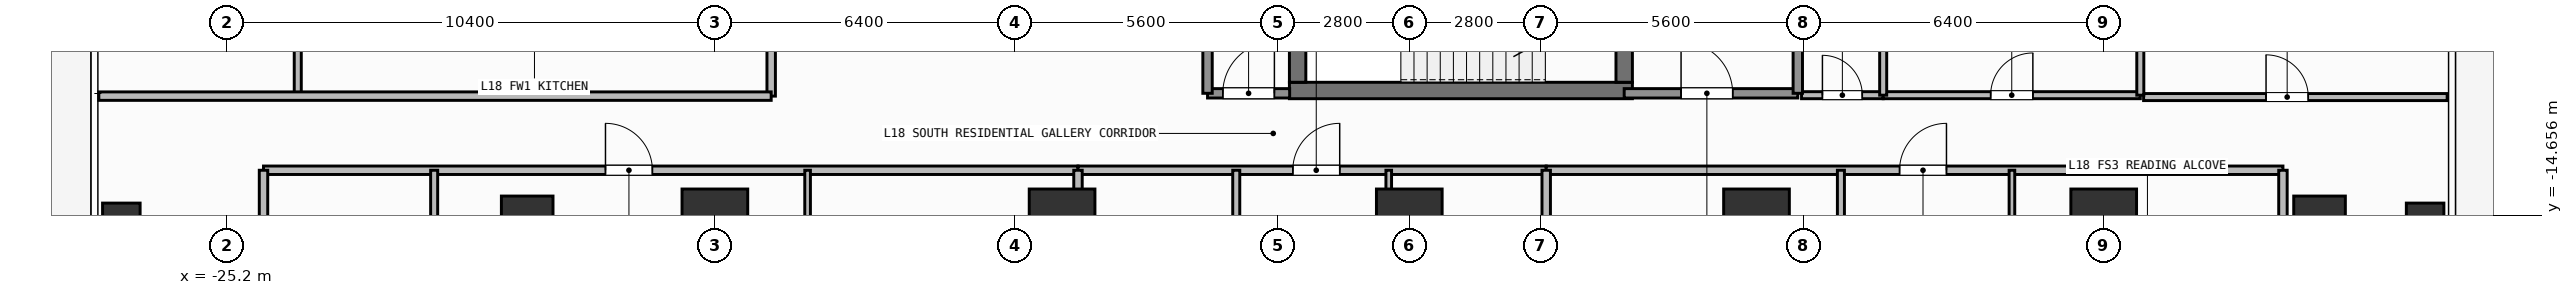
"""IFC4 building model, lengths in metres.
Left out: names, types, materials, properties, quantities, classifications, styles, units other than length and angle.
Written with IfcOpenShell. Run it as: python <this file> out.ifc"""

import sys

from ifc_helpers import new_model, si_unit, direction, frame, frame_2d, origin, origin_2d, place, context, subcontext, project, spatial, rectangle, hollow_rectangle, extrude, element, fill, save


model = new_model("IFC4")
c1 = context("Model", 3, precision=1e-05, world=origin(), true_north=direction((0.0, 1.0)))
c2 = subcontext(c1, "Body", "Model", "MODEL_VIEW")
j1 = project(units=[si_unit("LENGTHUNIT", "METRE"), si_unit("PLANEANGLEUNIT", "RADIAN")], contexts=[c1])
p1 = place(None, origin())
s1 = spatial("IfcSite", under=j1, at=p1, CompositionType="ELEMENT")
p2 = place(p1, origin())
s2 = spatial("IfcBuilding", under=s1, at=p2, CompositionType="ELEMENT")
p3 = place(p2, frame((0.0, 0.0, 69.6)))
s3 = spatial("IfcBuildingStorey", under=s2, at=p3, CompositionType="ELEMENT", Elevation=69.6)
p4 = place(p3, frame((-2.555, -12.0, 0.0), z_axis=(0.0, 0.0, 1.0), x_axis=(1.0, 0.0, 0.0)))
e1 = element("IfcWall", 1, at=p4, inside=s3, PredefinedType="SHEAR", context=c2, shape_type="SweptSolid", body=[
    extrude(rectangle(XDim=7.31, YDim=0.35, at=frame_2d((3.655, 0.0))), origin(), (0.0, 0.0, 1.0), 3.9),
])
p5 = place(p3, frame((-2.38, -11.825, 0.0), z_axis=(0.0, 0.0, 1.0), x_axis=(0.0, 1.0, 0.0)))
e2 = element("IfcWall", 2, at=p5, inside=s3, PredefinedType="SHEAR", context=c2, shape_type="SweptSolid", body=[
    extrude(rectangle(XDim=2.925, YDim=0.35, at=frame_2d((1.462, 0.0))), origin(), (0.0, 0.0, 1.0), 3.9),
])
p6 = place(p3, frame((4.58, -8.9, 0.0), z_axis=(0.0, 0.0, 1.0), x_axis=(0.0, -1.0, 0.0)))
e3 = element("IfcWall", 3, at=p6, inside=s3, PredefinedType="SHEAR", context=c2, shape_type="SweptSolid", body=[
    extrude(rectangle(XDim=2.925, YDim=0.35, at=frame_2d((1.462, 0.0))), origin(), (0.0, 0.0, 1.0), 3.9),
])
p7 = place(p6, frame((0.913, 0.0, 0.0)))
e4 = element("IfcOpeningElement", 4, at=p7, cuts=e3, PredefinedType="OPENING", context=c2, shape_type="SweptSolid", body=[
    extrude(rectangle(XDim=1.1, YDim=2.15, at=frame_2d((0.55, 1.075))), frame((0.0, 0.185, 0.0), z_axis=(0.0, -1.0, 0.0), x_axis=(1.0, 0.0, 0.0)), (0.0, 0.0, 1.0), 0.37),
])
for number, where, z_axis, x_axis in (
    (5, (-14.8, -14.8, 0.0), (0.0, 0.0, 1.0), (1.0, 0.0, 0.0)),
    (6, (-7.4, -14.8, 0.0), (0.0, 0.0, 1.0), (1.0, 0.0, 0.0)),
    (7, (0.0, -14.8, 0.0), (0.0, 0.0, 1.0), (1.0, 0.0, 0.0)),
    (8, (7.4, -14.8, 0.0), (0.0, 0.0, 1.0), (1.0, 0.0, 0.0)),
    (9, (14.8, -14.8, 0.0), (0.0, 0.0, 1.0), (1.0, 0.0, 0.0)),
):
    element("IfcColumn", number, at=place(p3, frame(where, z_axis=z_axis, x_axis=x_axis)), inside=s3, PredefinedType="COLUMN", context=c2, shape_type="SweptSolid", body=[
        extrude(rectangle(XDim=1.4, YDim=1.4, at=origin_2d()), origin(), (0.0, 0.0, 1.0), 3.9),
    ])
for number, where, z_axis, x_axis in (
    (10, (-18.8, -14.8, 0.0), (0.0, 0.0, 1.0), (1.0, 0.0, 0.0)),
    (11, (19.4, -14.8, 0.0), (0.0, 0.0, 1.0), (1.0, 0.0, 0.0)),
):
    element("IfcColumn", number, at=place(p3, frame(where, z_axis=z_axis, x_axis=x_axis)), inside=s3, PredefinedType="COLUMN", context=c2, shape_type="SweptSolid", body=[
        extrude(rectangle(XDim=1.1, YDim=1.1, at=origin_2d()), origin(), (0.0, 0.0, 1.0), 3.9),
    ])
for number, where, z_axis, x_axis in (
    (12, (-27.45, -14.8, 0.0), (0.0, 0.0, 1.0), (1.0, 0.0, 0.0)),
    (13, (21.65, -14.8, 0.0), (0.0, 0.0, 1.0), (1.0, 0.0, 0.0)),
):
    element("IfcColumn", number, at=place(p3, frame(where, z_axis=z_axis, x_axis=x_axis)), inside=s3, PredefinedType="COLUMN", context=c2, shape_type="SweptSolid", body=[
        extrude(hollow_rectangle(XDim=0.8, YDim=0.8, WallThickness=0.036, at=origin_2d()), origin(), (0.0, 0.0, 1.0), 3.9),
    ])
p8 = place(p3, frame((4.58, -12.06, 0.0), z_axis=(0.0, 0.0, 1.0), x_axis=(1.0, 0.0, 0.0)))
e14 = element("IfcWall", 14, at=p8, inside=s3, PredefinedType="SOLIDWALL", context=c2, shape_type="SweptSolid", body=[
    extrude(rectangle(XDim=3.7, YDim=0.2, at=frame_2d((1.85, 0.0))), origin(), (0.0, 0.0, 1.0), 3.68),
])
p9 = place(p8, frame((1.212, 0.0, 0.0)))
e15 = element("IfcOpeningElement", 15, at=p9, cuts=e14, PredefinedType="OPENING", context=c2, shape_type="SweptSolid", body=[
    extrude(rectangle(XDim=1.1, YDim=2.15, at=frame_2d((0.55, 1.075))), frame((0.0, 0.11, 0.0), z_axis=(0.0, -1.0, 0.0), x_axis=(1.0, 0.0, 0.0)), (0.0, 0.0, 1.0), 0.22),
])
p10 = place(p3, frame((-4.3, -12.06, 0.0), z_axis=(0.0, 0.0, 1.0), x_axis=(1.0, 0.0, 0.0)))
e16 = element("IfcWall", 16, at=p10, inside=s3, PredefinedType="SOLIDWALL", context=c2, shape_type="SweptSolid", body=[
    extrude(rectangle(XDim=1.75, YDim=0.2, at=frame_2d((0.875, 0.0))), origin(), (0.0, 0.0, 1.0), 3.68),
])
p11 = place(p10, frame((0.325, 0.0, 0.0)))
e17 = element("IfcOpeningElement", 17, at=p11, cuts=e16, PredefinedType="OPENING", context=c2, shape_type="SweptSolid", body=[
    extrude(rectangle(XDim=1.1, YDim=2.15, at=frame_2d((0.55, 1.075))), frame((0.0, 0.11, 0.0), z_axis=(0.0, -1.0, 0.0), x_axis=(1.0, 0.0, 0.0)), (0.0, 0.0, 1.0), 0.22),
])
p12 = place(p3, frame((8.36, -12.1, 0.0), z_axis=(0.0, 0.0, 1.0), x_axis=(1.0, 0.0, 0.0)))
e18 = element("IfcWall", 18, at=p12, inside=s3, PredefinedType="PARTITIONING", context=c2, shape_type="SweptSolid", body=[
    extrude(rectangle(XDim=1.74, YDim=0.15, at=frame_2d((0.87, 0.0))), origin(), (0.0, 0.0, 1.0), 3.68),
])
p13 = place(p12, frame((0.445, 0.0, 0.0)))
e19 = element("IfcOpeningElement", 19, at=p13, cuts=e18, PredefinedType="OPENING", context=c2, shape_type="SweptSolid", body=[
    extrude(rectangle(XDim=0.85, YDim=2.1, at=frame_2d((0.425, 1.05))), frame((0.0, 0.085, 0.0), z_axis=(0.0, -1.0, 0.0), x_axis=(1.0, 0.0, 0.0)), (0.0, 0.0, 1.0), 0.17),
])
p14 = place(p3, frame((10.1, -12.1, 0.0), z_axis=(0.0, 0.0, 1.0), x_axis=(1.0, 0.0, 0.0)))
e20 = element("IfcWall", 20, at=p14, inside=s3, PredefinedType="PARTITIONING", context=c2, shape_type="SweptSolid", body=[
    extrude(rectangle(XDim=5.48, YDim=0.15, at=frame_2d((2.74, 0.0))), origin(), (0.0, 0.0, 1.0), 3.68),
])
p15 = place(p14, frame((2.29, 0.0, 0.0)))
e21 = element("IfcOpeningElement", 21, at=p15, cuts=e20, PredefinedType="OPENING", context=c2, shape_type="SweptSolid", body=[
    extrude(rectangle(XDim=0.9, YDim=2.1, at=frame_2d((0.45, 1.05))), frame((0.0, 0.085, 0.0), z_axis=(0.0, -1.0, 0.0), x_axis=(1.0, 0.0, 0.0)), (0.0, 0.0, 1.0), 0.17),
])
p16 = place(p3, frame((-24.42, -13.7, 0.0), z_axis=(0.0, 0.0, 1.0), x_axis=(1.0, 0.0, 0.0)))
e22 = element("IfcWall", 22, at=p16, inside=s3, PredefinedType="PARTITIONING", context=c2, shape_type="SweptSolid", body=[
    extrude(rectangle(XDim=17.359, YDim=0.18, at=frame_2d((8.679, 0.0))), origin(), (0.0, 0.0, 1.0), 3.68),
])
p17 = place(p16, frame((7.288, 0.0, 0.0)))
e23 = element("IfcOpeningElement", 23, at=p17, cuts=e22, PredefinedType="OPENING", context=c2, shape_type="SweptSolid", body=[
    extrude(rectangle(XDim=1.0, YDim=2.2, at=frame_2d((0.5, 1.1))), frame((0.0, 0.1, 0.0), z_axis=(0.0, -1.0, 0.0), x_axis=(1.0, 0.0, 0.0)), (0.0, 0.0, 1.0), 0.2),
])
p18 = place(p3, frame((-20.783, -20.79, 0.0), z_axis=(0.0, 0.0, 1.0), x_axis=(0.0, 1.0, 0.0)))
e24 = element("IfcWall", 24, at=p18, inside=s3, PredefinedType="PARTITIONING", context=c2, shape_type="SweptSolid", body=[
    extrude(rectangle(XDim=7.09, YDim=0.15, at=frame_2d((3.545, 0.0))), origin(), (0.0, 0.0, 1.0), 3.68),
])
p19 = place(p18, frame((3.03, 0.0, 0.0)))
e25 = element("IfcOpeningElement", 25, at=p19, cuts=e24, PredefinedType="OPENING", context=c2, shape_type="SweptSolid", body=[
    extrude(rectangle(XDim=0.85, YDim=2.1, at=frame_2d((0.425, 1.05))), frame((0.0, 0.085, 0.0), z_axis=(0.0, -1.0, 0.0), x_axis=(1.0, 0.0, 0.0)), (0.0, 0.0, 1.0), 0.17),
])
p20 = place(p3, frame((-12.824, -18.663, 0.0), z_axis=(0.0, 0.0, 1.0), x_axis=(0.0, 1.0, 0.0)))
e26 = element("IfcWall", 26, at=p20, inside=s3, PredefinedType="PARTITIONING", context=c2, shape_type="SweptSolid", body=[
    extrude(rectangle(XDim=4.963, YDim=0.12, at=frame_2d((2.481, 0.0))), origin(), (0.0, 0.0, 1.0), 3.68),
])
p21 = place(p20, frame((2.229, 0.0, 0.0)))
e27 = element("IfcOpeningElement", 27, at=p21, cuts=e26, PredefinedType="OPENING", context=c2, shape_type="SweptSolid", body=[
    extrude(rectangle(XDim=0.85, YDim=2.1, at=frame_2d((0.425, 1.05))), frame((0.0, 0.07, 0.0), z_axis=(0.0, -1.0, 0.0), x_axis=(1.0, 0.0, 0.0)), (0.0, 0.0, 1.0), 0.14),
])
p22 = place(p3, frame((-7.061, -13.7, 0.0), z_axis=(0.0, 0.0, 1.0), x_axis=(1.0, 0.0, 0.0)))
e28 = element("IfcWall", 28, at=p22, inside=s3, PredefinedType="PARTITIONING", context=c2, shape_type="SweptSolid", body=[
    extrude(rectangle(XDim=9.979, YDim=0.18, at=frame_2d((4.99, 0.0))), origin(), (0.0, 0.0, 1.0), 3.68),
])
p23 = place(p22, frame((4.578, 0.0, 0.0)))
e29 = element("IfcOpeningElement", 29, at=p23, cuts=e28, PredefinedType="OPENING", context=c2, shape_type="SweptSolid", body=[
    extrude(rectangle(XDim=1.0, YDim=2.2, at=frame_2d((0.5, 1.1))), frame((0.0, 0.1, 0.0), z_axis=(0.0, -1.0, 0.0), x_axis=(1.0, 0.0, 0.0)), (0.0, 0.0, 1.0), 0.2),
])
p24 = place(p3, frame((-3.688, -20.79, 0.0), z_axis=(0.0, 0.0, 1.0), x_axis=(0.0, 1.0, 0.0)))
e30 = element("IfcWall", 30, at=p24, inside=s3, PredefinedType="PARTITIONING", context=c2, shape_type="SweptSolid", body=[
    extrude(rectangle(XDim=7.09, YDim=0.15, at=frame_2d((3.545, 0.0))), origin(), (0.0, 0.0, 1.0), 3.68),
])
p25 = place(p24, frame((3.03, 0.0, 0.0)))
e31 = element("IfcOpeningElement", 31, at=p25, cuts=e30, PredefinedType="OPENING", context=c2, shape_type="SweptSolid", body=[
    extrude(rectangle(XDim=0.85, YDim=2.1, at=frame_2d((0.425, 1.05))), frame((0.0, 0.085, 0.0), z_axis=(0.0, -1.0, 0.0), x_axis=(1.0, 0.0, 0.0)), (0.0, 0.0, 1.0), 0.17),
])
p26 = place(p3, frame((-0.438, -18.082, 0.0), z_axis=(0.0, 0.0, 1.0), x_axis=(0.0, 1.0, 0.0)))
e32 = element("IfcWall", 32, at=p26, inside=s3, PredefinedType="PARTITIONING", context=c2, shape_type="SweptSolid", body=[
    extrude(rectangle(XDim=4.382, YDim=0.12, at=frame_2d((2.191, 0.0))), origin(), (0.0, 0.0, 1.0), 3.68),
])
p27 = place(p26, frame((1.588, 0.0, 0.0)))
e33 = element("IfcOpeningElement", 33, at=p27, cuts=e32, PredefinedType="OPENING", context=c2, shape_type="SweptSolid", body=[
    extrude(rectangle(XDim=0.85, YDim=2.1, at=frame_2d((0.425, 1.05))), frame((0.0, 0.07, 0.0), z_axis=(0.0, -1.0, 0.0), x_axis=(1.0, 0.0, 0.0)), (0.0, 0.0, 1.0), 0.14),
])
p28 = place(p3, frame((2.918, -13.7, 0.0), z_axis=(0.0, 0.0, 1.0), x_axis=(1.0, 0.0, 0.0)))
e34 = element("IfcWall", 34, at=p28, inside=s3, PredefinedType="PARTITIONING", context=c2, shape_type="SweptSolid", body=[
    extrude(rectangle(XDim=15.702, YDim=0.18, at=frame_2d((7.851, 0.0))), origin(), (0.0, 0.0, 1.0), 3.68),
])
p29 = place(p28, frame((7.531, 0.0, 0.0)))
e35 = element("IfcOpeningElement", 35, at=p29, cuts=e34, PredefinedType="OPENING", context=c2, shape_type="SweptSolid", body=[
    extrude(rectangle(XDim=1.0, YDim=2.2, at=frame_2d((0.5, 1.1))), frame((0.0, 0.1, 0.0), z_axis=(0.0, -1.0, 0.0), x_axis=(1.0, 0.0, 0.0)), (0.0, 0.0, 1.0), 0.2),
])
p30 = place(p3, frame((9.199, -20.79, 0.0), z_axis=(0.0, 0.0, 1.0), x_axis=(0.0, 1.0, 0.0)))
e36 = element("IfcWall", 36, at=p30, inside=s3, PredefinedType="PARTITIONING", context=c2, shape_type="SweptSolid", body=[
    extrude(rectangle(XDim=7.09, YDim=0.15, at=frame_2d((3.545, 0.0))), origin(), (0.0, 0.0, 1.0), 3.68),
])
p31 = place(p30, frame((2.133, 0.0, 0.0)))
e37 = element("IfcOpeningElement", 37, at=p31, cuts=e36, PredefinedType="OPENING", context=c2, shape_type="SweptSolid", body=[
    extrude(rectangle(XDim=0.85, YDim=2.1, at=frame_2d((0.425, 1.05))), frame((0.0, 0.085, 0.0), z_axis=(0.0, -1.0, 0.0), x_axis=(1.0, 0.0, 0.0)), (0.0, 0.0, 1.0), 0.17),
])
p32 = place(p3, frame((12.844, -17.1, 0.0), z_axis=(0.0, 0.0, 1.0), x_axis=(0.0, 1.0, 0.0)))
e38 = element("IfcWall", 38, at=p32, inside=s3, PredefinedType="PARTITIONING", context=c2, shape_type="SweptSolid", body=[
    extrude(rectangle(XDim=3.4, YDim=0.12, at=frame_2d((1.7, 0.0))), origin(), (0.0, 0.0, 1.0), 3.68),
])
p33 = place(p32, frame((0.675, 0.0, 0.0)))
e39 = element("IfcOpeningElement", 39, at=p33, cuts=e38, PredefinedType="OPENING", context=c2, shape_type="SweptSolid", body=[
    extrude(rectangle(XDim=0.85, YDim=2.1, at=frame_2d((0.425, 1.05))), frame((0.0, 0.07, 0.0), z_axis=(0.0, -1.0, 0.0), x_axis=(1.0, 0.0, 0.0)), (0.0, 0.0, 1.0), 0.14),
])
p34 = place(p3, frame((-13.6, -12.12, 0.0), z_axis=(0.0, 0.0, 1.0), x_axis=(0.0, 1.0, 0.0)))
e40 = element("IfcWall", 40, at=p34, inside=s3, PredefinedType="PARTITIONING", context=c2, shape_type="SweptSolid", body=[
    extrude(rectangle(XDim=11.247, YDim=0.18, at=frame_2d((5.624, 0.0))), origin(), (0.0, 0.0, 1.0), 3.68),
])
p35 = place(p34, frame((5.478, 0.0, 0.0)))
e41 = element("IfcOpeningElement", 41, at=p35, cuts=e40, PredefinedType="OPENING", context=c2, shape_type="SweptSolid", body=[
    extrude(rectangle(XDim=1.0, YDim=2.2, at=frame_2d((0.5, 1.1))), frame((0.0, 0.1, 0.0), z_axis=(0.0, -1.0, 0.0), x_axis=(1.0, 0.0, 0.0)), (0.0, 0.0, 1.0), 0.2),
])
p36 = place(p3, frame((15.65, -12.14, 0.0), z_axis=(0.0, 0.0, 1.0), x_axis=(1.0, 0.0, 0.0)))
e42 = element("IfcWall", 42, at=p36, inside=s3, PredefinedType="PARTITIONING", context=c2, shape_type="SweptSolid", body=[
    extrude(rectangle(XDim=6.47, YDim=0.15, at=frame_2d((3.235, 0.0))), origin(), (0.0, 0.0, 1.0), 3.68),
])
p37 = place(p36, frame((2.61, 0.0, 0.0)))
e43 = element("IfcOpeningElement", 43, at=p37, cuts=e42, PredefinedType="OPENING", context=c2, shape_type="SweptSolid", body=[
    extrude(rectangle(XDim=0.9, YDim=2.1, at=frame_2d((0.45, 1.05))), frame((0.0, 0.085, 0.0), z_axis=(0.0, -1.0, 0.0), x_axis=(1.0, 0.0, 0.0)), (0.0, 0.0, 1.0), 0.17),
])
for number, where, z_axis, x_axis in (
    (44, (8.28, -12.06, 0.0), (0.0, 0.0, 1.0), (0.0, 1.0, 0.0)),
    (45, (-4.3, -12.06, 0.0), (0.0, 0.0, 1.0), (0.0, 1.0, 0.0)),
):
    element("IfcWall", number, at=place(p3, frame(where, z_axis=z_axis, x_axis=x_axis)), inside=s3, PredefinedType="SOLIDWALL", context=c2, shape_type="SweptSolid", body=[
        extrude(rectangle(XDim=3.11, YDim=0.2, at=frame_2d((1.555, 0.0))), origin(), (0.0, 0.0, 1.0), 3.68),
    ])
p38 = place(p3, frame((10.1, -12.1, 0.0), z_axis=(0.0, 0.0, 1.0), x_axis=(0.0, 1.0, 0.0)))
e46 = element("IfcWall", 46, at=p38, inside=s3, PredefinedType="PARTITIONING", context=c2, shape_type="SweptSolid", body=[
    extrude(rectangle(XDim=2.35, YDim=0.15, at=frame_2d((1.175, 0.0))), origin(), (0.0, 0.0, 1.0), 3.68),
])
p39 = place(p3, frame((15.58, -12.1, 0.0), z_axis=(0.0, 0.0, 1.0), x_axis=(0.0, 1.0, 0.0)))
e47 = element("IfcWall", 47, at=p39, inside=s3, PredefinedType="PARTITIONING", context=c2, shape_type="SweptSolid", body=[
    extrude(rectangle(XDim=6.25, YDim=0.15, at=frame_2d((3.125, 0.0))), origin(), (0.0, 0.0, 1.0), 3.68),
])
for number, where, z_axis, x_axis in (
    (48, (-24.42, -23.91, 0.0), (0.0, 0.0, 1.0), (0.0, 1.0, 0.0)),
    (49, (18.62, -23.91, 0.0), (0.0, 0.0, 1.0), (0.0, 1.0, 0.0)),
):
    element("IfcWall", number, at=place(p3, frame(where, z_axis=z_axis, x_axis=x_axis)), inside=s3, PredefinedType="PARTITIONING", context=c2, shape_type="SweptSolid", body=[
        extrude(rectangle(XDim=10.21, YDim=0.18, at=frame_2d((5.105, 0.0))), origin(), (0.0, 0.0, 1.0), 3.68),
    ])
for number, where, z_axis, x_axis in (
    (50, (-7.061, -25.03, 0.0), (0.0, 0.0, 1.0), (0.0, 1.0, 0.0)),
    (51, (2.918, -25.03, 0.0), (0.0, 0.0, 1.0), (0.0, 1.0, 0.0)),
):
    element("IfcWall", number, at=place(p3, frame(where, z_axis=z_axis, x_axis=x_axis)), inside=s3, PredefinedType="PARTITIONING", context=c2, shape_type="SweptSolid", body=[
        extrude(rectangle(XDim=11.33, YDim=0.18, at=frame_2d((5.665, 0.0))), origin(), (0.0, 0.0, 1.0), 3.68),
    ])
p40 = place(p3, frame((-23.69, -12.12, 0.0), z_axis=(0.0, 0.0, 1.0), x_axis=(0.0, 1.0, 0.0)))
e52 = element("IfcWall", 52, at=p40, inside=s3, PredefinedType="PARTITIONING", context=c2, shape_type="SweptSolid", body=[
    extrude(rectangle(XDim=2.8, YDim=0.15, at=frame_2d((1.4, 0.0))), origin(), (0.0, 0.0, 1.0), 3.68),
])
p41 = place(p3, frame((-27.93, -12.12, 0.0), z_axis=(0.0, 0.0, 1.0), x_axis=(1.0, 0.0, 0.0)))
e53 = element("IfcWall", 53, at=p41, inside=s3, PredefinedType="PARTITIONING", context=c2, shape_type="SweptSolid", body=[
    extrude(rectangle(XDim=14.33, YDim=0.18, at=frame_2d((7.165, 0.0))), origin(), (0.0, 0.0, 1.0), 3.68),
])
p42 = place(p9, origin())
e54 = element("IfcDoor", 54, at=p42, inside=s3, OperationType="SINGLE_SWING_LEFT", PredefinedType="DOOR", context=c2, shape_type="SweptSolid", body=[
    extrude(rectangle(XDim=1.1, YDim=2.15, at=frame_2d((0.55, 1.075))), frame((0.0, 0.025, 0.0), z_axis=(0.0, -1.0, 0.0), x_axis=(1.0, 0.0, 0.0)), (0.0, 0.0, 1.0), 0.05),
])
fill(e15, e54)
p43 = place(p11, origin())
e55 = element("IfcDoor", 55, at=p43, inside=s3, OperationType="SINGLE_SWING_RIGHT", PredefinedType="DOOR", context=c2, shape_type="SweptSolid", body=[
    extrude(rectangle(XDim=1.1, YDim=2.15, at=frame_2d((0.55, 1.075))), frame((0.0, 0.025, 0.0), z_axis=(0.0, -1.0, 0.0), x_axis=(1.0, 0.0, 0.0)), (0.0, 0.0, 1.0), 0.05),
])
fill(e17, e55)
p44 = place(p13, origin())
e56 = element("IfcDoor", 56, at=p44, inside=s3, OperationType="SINGLE_SWING_LEFT", PredefinedType="DOOR", context=c2, shape_type="SweptSolid", body=[
    extrude(rectangle(XDim=0.85, YDim=2.1, at=frame_2d((0.425, 1.05))), frame((0.0, 0.025, 0.0), z_axis=(0.0, -1.0, 0.0), x_axis=(1.0, 0.0, 0.0)), (0.0, 0.0, 1.0), 0.05),
])
fill(e19, e56)
p45 = place(p15, origin())
e57 = element("IfcDoor", 57, at=p45, inside=s3, OperationType="SINGLE_SWING_RIGHT", PredefinedType="DOOR", context=c2, shape_type="SweptSolid", body=[
    extrude(rectangle(XDim=0.9, YDim=2.1, at=frame_2d((0.45, 1.05))), frame((0.0, 0.025, 0.0), z_axis=(0.0, -1.0, 0.0), x_axis=(1.0, 0.0, 0.0)), (0.0, 0.0, 1.0), 0.05),
])
fill(e21, e57)
p46 = place(p17, origin())
e58 = element("IfcDoor", 58, at=p46, inside=s3, OperationType="SINGLE_SWING_LEFT", PredefinedType="DOOR", context=c2, shape_type="SweptSolid", body=[
    extrude(rectangle(XDim=1.0, YDim=2.2, at=frame_2d((0.5, 1.1))), frame((0.0, 0.025, 0.0), z_axis=(0.0, -1.0, 0.0), x_axis=(1.0, 0.0, 0.0)), (0.0, 0.0, 1.0), 0.05),
])
fill(e23, e58)
p47 = place(p23, origin())
e59 = element("IfcDoor", 59, at=p47, inside=s3, OperationType="SINGLE_SWING_RIGHT", PredefinedType="DOOR", context=c2, shape_type="SweptSolid", body=[
    extrude(rectangle(XDim=1.0, YDim=2.2, at=frame_2d((0.5, 1.1))), frame((0.0, 0.025, 0.0), z_axis=(0.0, -1.0, 0.0), x_axis=(1.0, 0.0, 0.0)), (0.0, 0.0, 1.0), 0.05),
])
fill(e29, e59)
p48 = place(p29, origin())
e60 = element("IfcDoor", 60, at=p48, inside=s3, OperationType="SINGLE_SWING_RIGHT", PredefinedType="DOOR", context=c2, shape_type="SweptSolid", body=[
    extrude(rectangle(XDim=1.0, YDim=2.2, at=frame_2d((0.5, 1.1))), frame((0.0, 0.025, 0.0), z_axis=(0.0, -1.0, 0.0), x_axis=(1.0, 0.0, 0.0)), (0.0, 0.0, 1.0), 0.05),
])
fill(e35, e60)
p49 = place(p37, origin())
e61 = element("IfcDoor", 61, at=p49, inside=s3, OperationType="SINGLE_SWING_LEFT", PredefinedType="DOOR", context=c2, shape_type="SweptSolid", body=[
    extrude(rectangle(XDim=0.9, YDim=2.1, at=frame_2d((0.45, 1.05))), frame((0.0, 0.025, 0.0), z_axis=(0.0, -1.0, 0.0), x_axis=(1.0, 0.0, 0.0)), (0.0, 0.0, 1.0), 0.05),
])
fill(e43, e61)
save(model, sys.argv[1])
